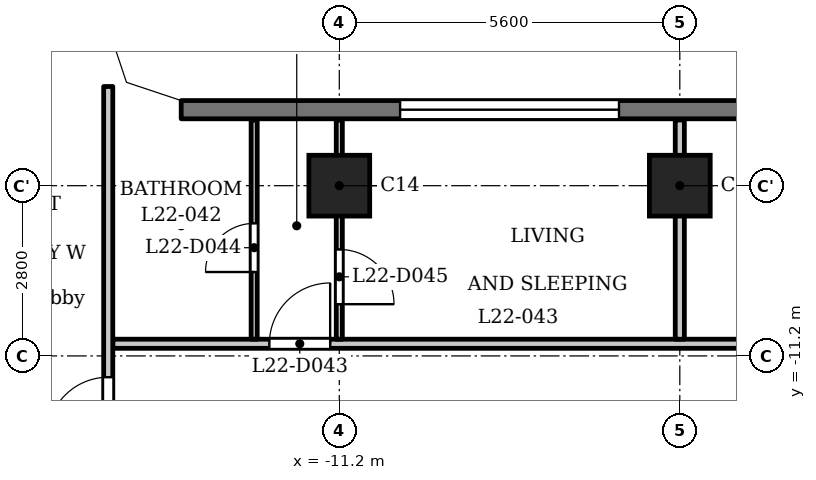
"""IFC4 building model, lengths in metres.
Left out: names, types, materials, properties, quantities, classifications, styles, units other than length and angle.
Written with IfcOpenShell. Run it as: python <this file> out.ifc"""

import sys

from ifc_helpers import new_model, si_unit, direction, frame, frame_2d, origin, origin_2d, place, context, subcontext, project, spatial, polyline, rectangle, outline, extrude, element, fill, save


model = new_model("IFC4")
c1 = context("Model", 3, precision=1e-05, world=origin(), true_north=direction((0.0, 1.0)))
c2 = subcontext(c1, "Body", "Model", "MODEL_VIEW")
j1 = project(units=[si_unit("LENGTHUNIT", "METRE"), si_unit("PLANEANGLEUNIT", "RADIAN")], contexts=[c1])
p1 = place(None, origin())
s1 = spatial("IfcSite", under=j1, at=p1, CompositionType="ELEMENT")
p2 = place(p1, origin())
s2 = spatial("IfcBuilding", under=s1, at=p2, CompositionType="ELEMENT")
p3 = place(p2, frame((0.0, 0.0, 90.3)))
s3 = spatial("IfcBuildingStorey", under=s2, at=p3, CompositionType="ELEMENT", Elevation=90.3)
for number, where, z_axis, x_axis in (
    (1, (-11.2, -8.4, 0.0), (0.0, 0.0, 1.0), (1.0, 0.0, 0.0)),
    (2, (-5.6, -8.4, 0.0), (0.0, 0.0, 1.0), (1.0, 0.0, 0.0)),
):
    element("IfcColumn", number, at=place(p3, frame(where, z_axis=z_axis, x_axis=x_axis)), inside=s3, PredefinedType="COLUMN", context=c2, shape_type="SweptSolid", body=[
        extrude(rectangle(XDim=1.0, YDim=1.0, at=origin_2d()), origin(), (0.0, 0.0, 1.0), 3.5),
    ])
p4 = place(p3, frame((13.8, -7.15, 0.0), z_axis=(0.0, 0.0, 1.0), x_axis=(-1.0, 0.0, 0.0)))
e3 = element("IfcWall", 3, at=p4, inside=s3, PredefinedType="SOLIDWALL", context=c2, shape_type="SweptSolid", body=[
    extrude(rectangle(XDim=27.6, YDim=0.3, at=frame_2d((13.8, 0.0))), origin(), (0.0, 0.0, 1.0), 3.2),
])
p5 = place(p4, frame((3.6, 0.0, 1.2)))
e4 = element("IfcOpeningElement", 4, at=p5, cuts=e3, PredefinedType="OPENING", context=c2, shape_type="SweptSolid", body=[
    extrude(rectangle(XDim=3.6, YDim=0.95, at=frame_2d((1.8, 0.475))), frame((0.0, 0.16, 0.0), z_axis=(0.0, -1.0, 0.0), x_axis=(1.0, 0.0, 0.0)), (0.0, 0.0, 1.0), 0.32),
])
p6 = place(p4, frame((8.8, 0.0, 0.6)))
e5 = element("IfcOpeningElement", 5, at=p6, cuts=e3, PredefinedType="OPENING", context=c2, shape_type="SweptSolid", body=[
    extrude(rectangle(XDim=1.2, YDim=1.55, at=frame_2d((0.6, 0.775))), frame((0.0, 0.16, 0.0), z_axis=(0.0, -1.0, 0.0), x_axis=(1.0, 0.0, 0.0)), (0.0, 0.0, 1.0), 0.32),
])
p7 = place(p4, frame((11.3, 0.0, 0.9)))
e6 = element("IfcOpeningElement", 6, at=p7, cuts=e3, PredefinedType="OPENING", context=c2, shape_type="SweptSolid", body=[
    extrude(rectangle(XDim=1.8, YDim=1.25, at=frame_2d((0.9, 0.625))), frame((0.0, 0.16, 0.0), z_axis=(0.0, -1.0, 0.0), x_axis=(1.0, 0.0, 0.0)), (0.0, 0.0, 1.0), 0.32),
])
p8 = place(p4, frame((14.8, 0.0, 1.2)))
e7 = element("IfcOpeningElement", 7, at=p8, cuts=e3, PredefinedType="OPENING", context=c2, shape_type="SweptSolid", body=[
    extrude(rectangle(XDim=3.6, YDim=0.95, at=frame_2d((1.8, 0.475))), frame((0.0, 0.16, 0.0), z_axis=(0.0, -1.0, 0.0), x_axis=(1.0, 0.0, 0.0)), (0.0, 0.0, 1.0), 0.32),
])
p9 = place(p4, frame((20.4, 0.0, 1.2)))
e8 = element("IfcOpeningElement", 8, at=p9, cuts=e3, PredefinedType="OPENING", context=c2, shape_type="SweptSolid", body=[
    extrude(rectangle(XDim=3.6, YDim=0.95, at=frame_2d((1.8, 0.475))), frame((0.0, 0.16, 0.0), z_axis=(0.0, -1.0, 0.0), x_axis=(1.0, 0.0, 0.0)), (0.0, 0.0, 1.0), 0.32),
])
p10 = place(p3, frame((-14.925, -11.0, 0.0), z_axis=(0.0, 0.0, 1.0), x_axis=(1.0, 0.0, 0.0)))
e9 = element("IfcWall", 9, at=p10, inside=s3, PredefinedType="PARTITIONING", context=c2, shape_type="SweptSolid", body=[
    extrude(rectangle(XDim=29.85, YDim=0.15, at=frame_2d((14.925, 0.0))), origin(), (0.0, 0.0, 1.0), 3.2),
])
p11 = place(p10, frame((2.575, 0.0, 0.0)))
e10 = element("IfcOpeningElement", 10, at=p11, cuts=e9, PredefinedType="OPENING", context=c2, shape_type="SweptSolid", body=[
    extrude(rectangle(XDim=1.0, YDim=2.1, at=frame_2d((0.5, 1.05))), frame((0.0, 0.085, 0.0), z_axis=(0.0, -1.0, 0.0), x_axis=(1.0, 0.0, 0.0)), (0.0, 0.0, 1.0), 0.17),
])
p12 = place(p10, frame((15.475, 0.0, 0.0)))
e11 = element("IfcOpeningElement", 11, at=p12, cuts=e9, PredefinedType="OPENING", context=c2, shape_type="SweptSolid", body=[
    extrude(rectangle(XDim=1.0, YDim=2.1, at=frame_2d((0.5, 1.05))), frame((0.0, 0.085, 0.0), z_axis=(0.0, -1.0, 0.0), x_axis=(1.0, 0.0, 0.0)), (0.0, 0.0, 1.0), 0.17),
])
p13 = place(p10, frame((26.375, 0.0, 0.0)))
e12 = element("IfcOpeningElement", 12, at=p13, cuts=e9, PredefinedType="OPENING", context=c2, shape_type="SweptSolid", body=[
    extrude(rectangle(XDim=1.0, YDim=2.1, at=frame_2d((0.5, 1.05))), frame((0.0, 0.085, 0.0), z_axis=(0.0, -1.0, 0.0), x_axis=(1.0, 0.0, 0.0)), (0.0, 0.0, 1.0), 0.17),
])
p14 = place(p3, frame((-15.0, -13.125, 0.0), z_axis=(0.0, 0.0, 1.0), x_axis=(0.0, 1.0, 0.0)))
e13 = element("IfcWall", 13, at=p14, inside=s3, PredefinedType="PARTITIONING", context=c2, shape_type="SweptSolid", body=[
    extrude(rectangle(XDim=6.356, YDim=0.15, at=frame_2d((3.178, 0.0))), origin(), (0.0, 0.0, 1.0), 3.2),
])
p15 = place(p14, frame((0.575, 0.0, 0.0)))
e14 = element("IfcOpeningElement", 14, at=p15, cuts=e13, PredefinedType="OPENING", context=c2, shape_type="SweptSolid", body=[
    extrude(rectangle(XDim=1.0, YDim=2.1, at=frame_2d((0.5, 1.05))), frame((0.0, 0.085, 0.0), z_axis=(0.0, -1.0, 0.0), x_axis=(1.0, 0.0, 0.0)), (0.0, 0.0, 1.0), 0.17),
])
p16 = place(p3, frame((-12.6, -10.925, 0.0), z_axis=(0.0, 0.0, 1.0), x_axis=(0.0, 1.0, 0.0)))
e15 = element("IfcWall", 15, at=p16, inside=s3, PredefinedType="PARTITIONING", context=c2, shape_type="SweptSolid", body=[
    extrude(rectangle(XDim=3.605, YDim=0.1, at=frame_2d((1.802, 0.0))), origin(), (0.0, 0.0, 1.0), 3.2),
])
p17 = place(p16, frame((1.105, 0.0, 0.0)))
e16 = element("IfcOpeningElement", 16, at=p17, cuts=e15, PredefinedType="OPENING", context=c2, shape_type="SweptSolid", body=[
    extrude(rectangle(XDim=0.8, YDim=2.1, at=frame_2d((0.4, 1.05))), frame((0.0, 0.06, 0.0), z_axis=(0.0, -1.0, 0.0), x_axis=(1.0, 0.0, 0.0)), (0.0, 0.0, 1.0), 0.12),
])
p18 = place(p3, frame((-11.2, -10.925, 0.0), z_axis=(0.0, 0.0, 1.0), x_axis=(0.0, 1.0, 0.0)))
e17 = element("IfcWall", 17, at=p18, inside=s3, PredefinedType="PARTITIONING", context=c2, shape_type="SweptSolid", body=[
    extrude(rectangle(XDim=3.605, YDim=0.1, at=frame_2d((1.802, 0.0))), origin(), (0.0, 0.0, 1.0), 3.2),
])
p19 = place(p18, frame((0.576, 0.0, 0.0)))
e18 = element("IfcOpeningElement", 18, at=p19, cuts=e17, PredefinedType="OPENING", context=c2, shape_type="SweptSolid", body=[
    extrude(rectangle(XDim=0.9, YDim=2.1, at=frame_2d((0.45, 1.05))), frame((0.0, 0.06, 0.0), z_axis=(0.0, -1.0, 0.0), x_axis=(1.0, 0.0, 0.0)), (0.0, 0.0, 1.0), 0.12),
])
p20 = place(p3, frame((-5.6, -10.925, 0.0), z_axis=(0.0, 0.0, 1.0), x_axis=(0.0, 1.0, 0.0)))
e19 = element("IfcWall", 19, at=p20, inside=s3, PredefinedType="PARTITIONING", context=c2, shape_type="SweptSolid", body=[
    extrude(rectangle(XDim=3.605, YDim=0.15, at=frame_2d((1.802, 0.0))), origin(), (0.0, 0.0, 1.0), 3.2),
])
p21 = place(p3, origin())
e20 = element("IfcWall", 20, at=p21, inside=s3, PredefinedType="SOLIDWALL", context=c2, shape_type="SweptSolid", body=[
    extrude(outline(polyline([(-14.937, -6.937), (-13.849, -7.3), (-13.8, -7.3), (-13.8, -7.0), (-14.7, -6.7), (-15.0, -5.8), (-15.3, -5.8), (-15.3, -5.849), (-14.937, -6.937)])), origin(), (0.0, 0.0, 1.0), 3.2),
])
p22 = place(p15, origin())
e21 = element("IfcDoor", 21, at=p22, inside=s3, OperationType="SINGLE_SWING_RIGHT", PredefinedType="DOOR", context=c2, shape_type="SweptSolid", body=[
    extrude(rectangle(XDim=1.0, YDim=2.1, at=frame_2d((0.5, 1.05))), frame((0.0, 0.025, 0.0), z_axis=(0.0, -1.0, 0.0), x_axis=(1.0, 0.0, 0.0)), (0.0, 0.0, 1.0), 0.05),
])
fill(e14, e21)
p23 = place(p11, origin())
e22 = element("IfcDoor", 22, at=p23, inside=s3, OperationType="SINGLE_SWING_LEFT", PredefinedType="DOOR", context=c2, shape_type="SweptSolid", body=[
    extrude(rectangle(XDim=1.0, YDim=2.1, at=frame_2d((0.5, 1.05))), frame((0.0, 0.025, 0.0), z_axis=(0.0, -1.0, 0.0), x_axis=(1.0, 0.0, 0.0)), (0.0, 0.0, 1.0), 0.05),
])
fill(e10, e22)
p24 = place(p17, origin())
e23 = element("IfcDoor", 23, at=p24, inside=s3, OperationType="SINGLE_SWING_RIGHT", PredefinedType="DOOR", context=c2, shape_type="SweptSolid", body=[
    extrude(rectangle(XDim=0.8, YDim=2.1, at=frame_2d((0.4, 1.05))), frame((0.0, 0.025, 0.0), z_axis=(0.0, -1.0, 0.0), x_axis=(1.0, 0.0, 0.0)), (0.0, 0.0, 1.0), 0.05),
])
fill(e16, e23)
p25 = place(p19, origin())
e24 = element("IfcDoor", 24, at=p25, inside=s3, OperationType="SINGLE_SWING_LEFT", PredefinedType="DOOR", context=c2, shape_type="SweptSolid", body=[
    extrude(rectangle(XDim=0.9, YDim=2.1, at=frame_2d((0.45, 1.05))), frame((0.0, 0.025, 0.0), z_axis=(0.0, -1.0, 0.0), x_axis=(1.0, 0.0, 0.0)), (0.0, 0.0, 1.0), 0.05),
])
fill(e18, e24)
p26 = place(p9, origin())
e25 = element("IfcWindow", 25, at=p26, inside=s3, PartitioningType="SINGLE_PANEL", PredefinedType="WINDOW", context=c2, shape_type="SweptSolid", body=[
    extrude(rectangle(XDim=3.6, YDim=0.95, at=frame_2d((1.8, 0.475))), frame((0.0, 0.03, 0.0), z_axis=(0.0, -1.0, 0.0), x_axis=(1.0, 0.0, 0.0)), (0.0, 0.0, 1.0), 0.06),
])
fill(e8, e25)
save(model, sys.argv[1])
